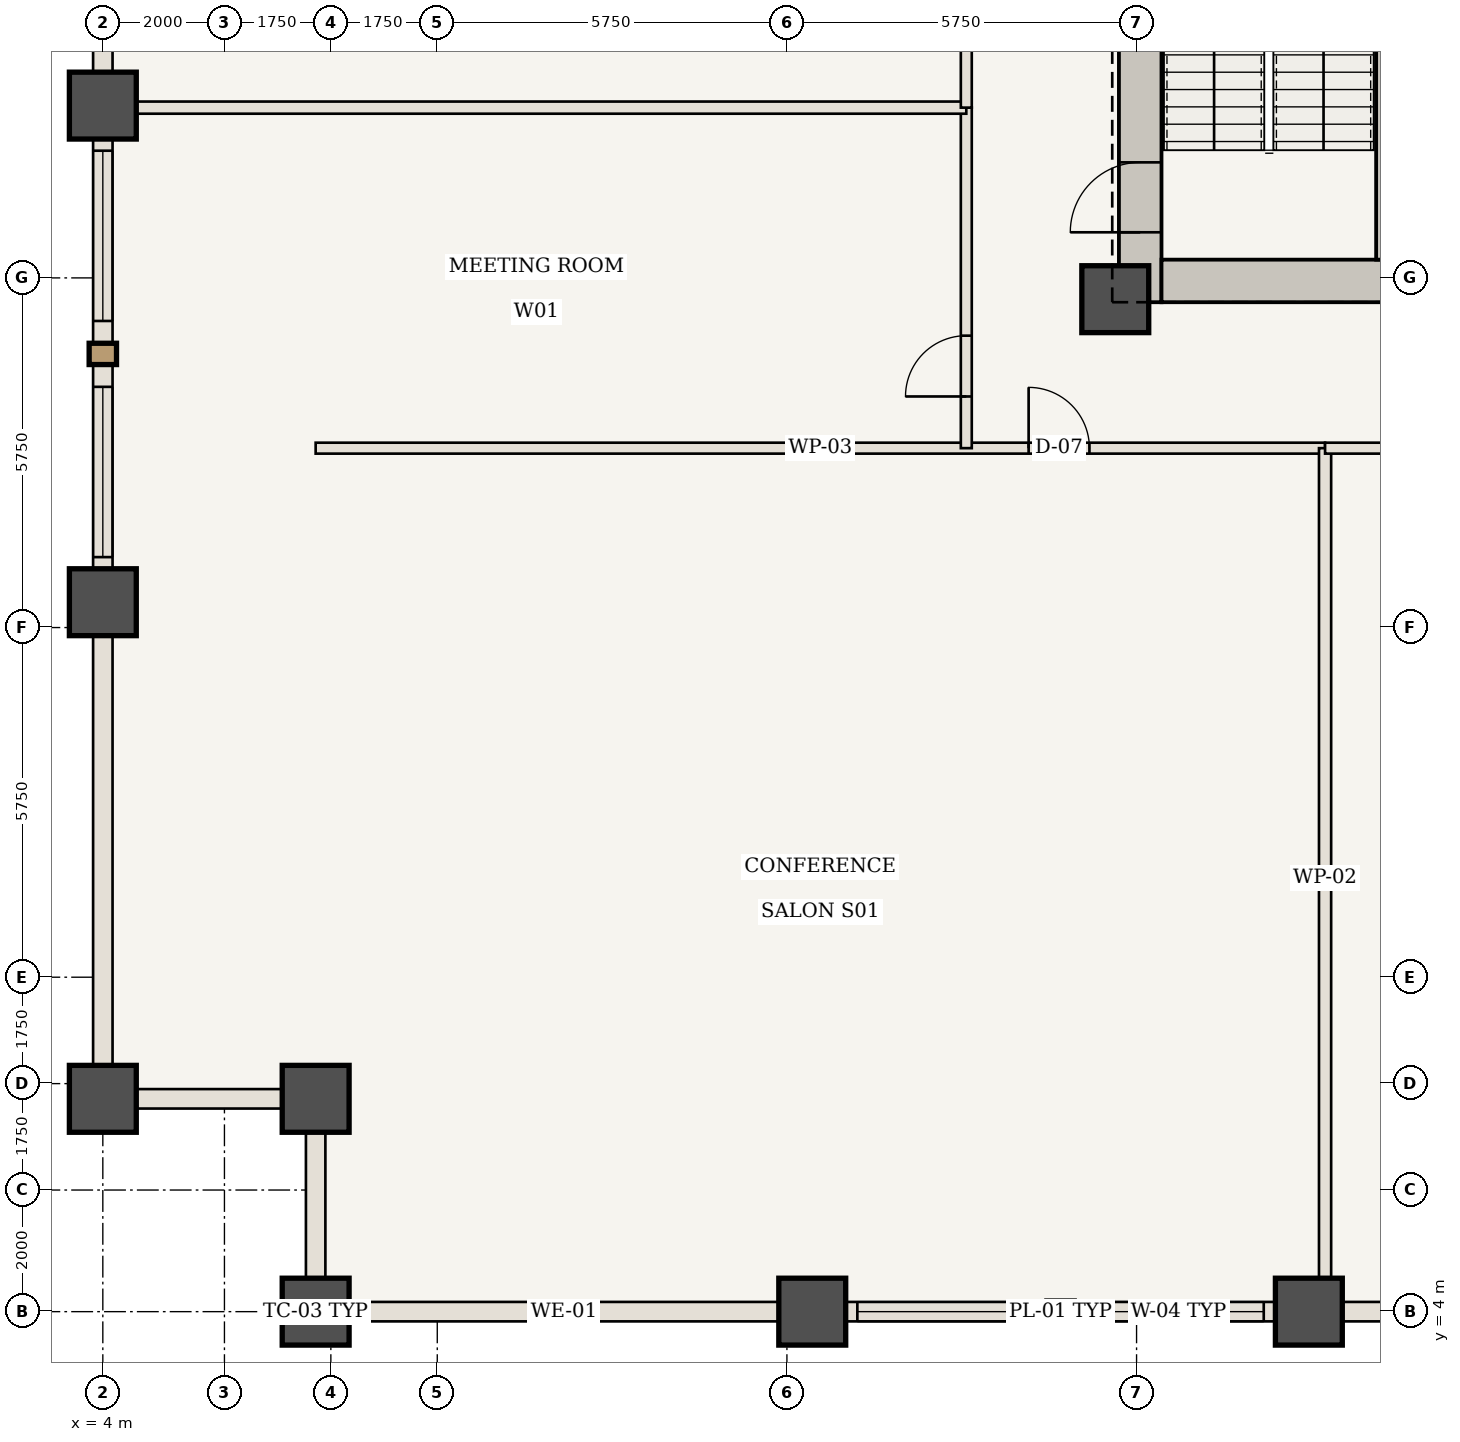
"""IFC4 building model, lengths in metres.
Left out: names, types, materials, properties, quantities, classifications, styles, units other than length and angle.
Written with IfcOpenShell. Run it as: python <this file> out.ifc"""

import sys

from ifc_helpers import new_model, si_unit, direction, frame, frame_2d, origin, origin_2d, place, context, subcontext, project, spatial, rectangle, extrude, element, fill, save


model = new_model("IFC4")
c1 = context("Model", 3, precision=1e-05, world=origin(), true_north=direction((0.0, 1.0)))
c2 = subcontext(c1, "Body", "Model", "MODEL_VIEW")
j1 = project(units=[si_unit("LENGTHUNIT", "METRE"), si_unit("PLANEANGLEUNIT", "RADIAN")], contexts=[c1])
p1 = place(None, origin())
s1 = spatial("IfcSite", under=j1, at=p1, CompositionType="ELEMENT")
p2 = place(p1, origin())
s2 = spatial("IfcBuilding", under=s1, at=p2, CompositionType="ELEMENT")
p3 = place(p2, frame((0.0, 0.0, 92.75)))
s3 = spatial("IfcBuildingStorey", under=s2, at=p3, CompositionType="ELEMENT", Elevation=92.75)
p4 = place(p3, frame((21.06, 20.6, 0.0), z_axis=(0.0, 0.0, 1.0), x_axis=(0.0, 1.0, 0.0)))
e1 = element("IfcWall", 1, at=p4, inside=s3, PredefinedType="SHEAR", context=c2, shape_type="SweptSolid", body=[
    extrude(rectangle(XDim=10.0, YDim=0.7, at=frame_2d((5.0, 0.0))), origin(), (0.0, 0.0, 1.0), 3.5),
])
p5 = place(p4, frame((1.15, 0.0, 0.0)))
e2 = element("IfcOpeningElement", 2, at=p5, cuts=e1, PredefinedType="OPENING", context=c2, shape_type="SweptSolid", body=[
    extrude(rectangle(XDim=1.15, YDim=2.15, at=frame_2d((0.575, 1.075))), frame((0.0, 0.36, 0.0), z_axis=(0.0, -1.0, 0.0), x_axis=(1.0, 0.0, 0.0)), (0.0, 0.0, 1.0), 0.72),
])
p6 = place(p3, frame((21.41, 20.95, 0.0), z_axis=(0.0, 0.0, 1.0), x_axis=(1.0, 0.0, 0.0)))
e3 = element("IfcWall", 3, at=p6, inside=s3, PredefinedType="SHEAR", context=c2, shape_type="SweptSolid", body=[
    extrude(rectangle(XDim=13.74, YDim=0.7, at=frame_2d((6.87, 0.0))), origin(), (0.0, 0.0, 1.0), 3.5),
])
p7 = place(p3, frame((25.29, 21.3, 0.0), z_axis=(0.0, 0.0, 1.0), x_axis=(0.0, 1.0, 0.0)))
e4 = element("IfcWall", 4, at=p7, inside=s3, PredefinedType="SHEAR", context=c2, shape_type="SweptSolid", body=[
    extrude(rectangle(XDim=9.3, YDim=0.7, at=frame_2d((4.65, 0.0))), origin(), (0.0, 0.0, 1.0), 3.5),
])
for number, where, z_axis, x_axis in (
    (5, (20.65, 20.65, 0.0), (0.0, 0.0, 1.0), (1.0, 0.0, 0.0)),
    (6, (7.5, 4.0, 0.0), (0.0, 0.0, 1.0), (1.0, 0.0, 0.0)),
    (7, (7.5, 7.5, 0.0), (0.0, 0.0, 1.0), (1.0, 0.0, 0.0)),
    (8, (4.0, 7.5, 0.0), (0.0, 0.0, 1.0), (1.0, 0.0, 0.0)),
    (9, (15.667, 4.0, 0.0), (0.0, 0.0, 1.0), (1.0, 0.0, 0.0)),
    (10, (4.0, 15.667, 0.0), (0.0, 0.0, 1.0), (1.0, 0.0, 0.0)),
    (11, (23.833, 4.0, 0.0), (0.0, 0.0, 1.0), (1.0, 0.0, 0.0)),
    (12, (4.0, 23.833, 0.0), (0.0, 0.0, 1.0), (1.0, 0.0, 0.0)),
):
    element("IfcColumn", number, at=place(p3, frame(where, z_axis=z_axis, x_axis=x_axis)), inside=s3, PredefinedType="COLUMN", context=c2, shape_type="SweptSolid", body=[
        extrude(rectangle(XDim=1.1, YDim=1.1, at=origin_2d()), origin(), (0.0, 0.0, 1.0), 3.5),
    ])
p8 = place(p3, frame((7.5, 18.2, 0.0), z_axis=(0.0, 0.0, 1.0), x_axis=(1.0, 0.0, 0.0)))
e13 = element("IfcWall", 13, at=p8, inside=s3, PredefinedType="STANDARD", context=c2, shape_type="SweptSolid", body=[
    extrude(rectangle(XDim=16.6, YDim=0.18, at=frame_2d((8.3, 0.0))), origin(), (0.0, 0.0, 1.0), 3.28),
])
p9 = place(p8, frame((11.725, 0.0, 0.0)))
e14 = element("IfcOpeningElement", 14, at=p9, cuts=e13, PredefinedType="OPENING", context=c2, shape_type="SweptSolid", body=[
    extrude(rectangle(XDim=1.0, YDim=2.15, at=frame_2d((0.5, 1.075))), frame((0.0, 0.1, 0.0), z_axis=(0.0, -1.0, 0.0), x_axis=(1.0, 0.0, 0.0)), (0.0, 0.0, 1.0), 0.2),
])
p10 = place(p3, frame((24.1, 4.06, 0.0), z_axis=(0.0, 0.0, 1.0), x_axis=(0.0, 1.0, 0.0)))
e15 = element("IfcWall", 15, at=p10, inside=s3, PredefinedType="STANDARD", context=c2, shape_type="SweptSolid", body=[
    extrude(rectangle(XDim=14.14, YDim=0.2, at=frame_2d((7.07, 0.0))), origin(), (0.0, 0.0, 1.0), 3.28),
])
p11 = place(p3, frame((24.1, 18.2, 0.0), z_axis=(0.0, 0.0, 1.0), x_axis=(1.0, 0.0, 0.0)))
e16 = element("IfcWall", 16, at=p11, inside=s3, PredefinedType="STANDARD", context=c2, shape_type="SweptSolid", body=[
    extrude(rectangle(XDim=9.7, YDim=0.18, at=frame_2d((4.85, 0.0))), origin(), (0.0, 0.0, 1.0), 3.28),
])
p12 = place(p11, frame((5.8, 0.0, 0.0)))
e17 = element("IfcOpeningElement", 17, at=p12, cuts=e16, PredefinedType="OPENING", context=c2, shape_type="SweptSolid", body=[
    extrude(rectangle(XDim=1.0, YDim=2.15, at=frame_2d((0.5, 1.075))), frame((0.0, 0.1, 0.0), z_axis=(0.0, -1.0, 0.0), x_axis=(1.0, 0.0, 0.0)), (0.0, 0.0, 1.0), 0.2),
])
p13 = place(p3, frame((18.2, 18.2, 0.0), z_axis=(0.0, 0.0, 1.0), x_axis=(0.0, 1.0, 0.0)))
e18 = element("IfcWall", 18, at=p13, inside=s3, PredefinedType="STANDARD", context=c2, shape_type="SweptSolid", body=[
    extrude(rectangle(XDim=5.6, YDim=0.18, at=frame_2d((2.8, 0.0))), origin(), (0.0, 0.0, 1.0), 3.28),
])
p14 = place(p13, frame((0.85, 0.0, 0.0)))
e19 = element("IfcOpeningElement", 19, at=p14, cuts=e18, PredefinedType="OPENING", context=c2, shape_type="SweptSolid", body=[
    extrude(rectangle(XDim=1.0, YDim=2.15, at=frame_2d((0.5, 1.075))), frame((0.0, 0.1, 0.0), z_axis=(0.0, -1.0, 0.0), x_axis=(1.0, 0.0, 0.0)), (0.0, 0.0, 1.0), 0.2),
])
p15 = place(p3, frame((4.06, 23.8, 0.0), z_axis=(0.0, 0.0, 1.0), x_axis=(1.0, 0.0, 0.0)))
e20 = element("IfcWall", 20, at=p15, inside=s3, PredefinedType="STANDARD", context=c2, shape_type="SweptSolid", body=[
    extrude(rectangle(XDim=14.14, YDim=0.2, at=frame_2d((7.07, 0.0))), origin(), (0.0, 0.0, 1.0), 3.28),
])
p16 = place(p3, frame((18.2, 23.8, 0.0), z_axis=(0.0, 0.0, 1.0), x_axis=(0.0, 1.0, 0.0)))
e21 = element("IfcWall", 21, at=p16, inside=s3, PredefinedType="STANDARD", context=c2, shape_type="SweptSolid", body=[
    extrude(rectangle(XDim=10.7, YDim=0.18, at=frame_2d((5.35, 0.0))), origin(), (0.0, 0.0, 1.0), 3.28),
])
p17 = place(p16, frame((4.85, 0.0, 0.0)))
e22 = element("IfcOpeningElement", 22, at=p17, cuts=e21, PredefinedType="OPENING", context=c2, shape_type="SweptSolid", body=[
    extrude(rectangle(XDim=1.0, YDim=2.15, at=frame_2d((0.5, 1.075))), frame((0.0, 0.1, 0.0), z_axis=(0.0, -1.0, 0.0), x_axis=(1.0, 0.0, 0.0)), (0.0, 0.0, 1.0), 0.2),
])
p18 = place(p3, frame((15.667, 4.0, 0.0), z_axis=(0.0, 0.0, 1.0), x_axis=(-1.0, 0.0, 0.0)))
e23 = element("IfcWall", 23, at=p18, inside=s3, PredefinedType="USERDEFINED", context=c2, shape_type="SweptSolid", body=[
    extrude(rectangle(XDim=8.167, YDim=0.32, at=frame_2d((4.083, 0.0))), origin(), (0.0, 0.0, 1.0), 2.48),
])
p19 = place(p3, frame((23.833, 4.0, 0.0), z_axis=(0.0, 0.0, 1.0), x_axis=(-1.0, 0.0, 0.0)))
e24 = element("IfcWall", 24, at=p19, inside=s3, PredefinedType="USERDEFINED", context=c2, shape_type="SweptSolid", body=[
    extrude(rectangle(XDim=8.167, YDim=0.32, at=frame_2d((4.083, 0.0))), origin(), (0.0, 0.0, 1.0), 2.48),
])
p20 = place(p19, frame((0.742, 0.0, 0.85)))
e25 = element("IfcOpeningElement", 25, at=p20, cuts=e24, PredefinedType="OPENING", context=c2, shape_type="SweptSolid", body=[
    extrude(rectangle(XDim=2.8, YDim=1.43, at=frame_2d((1.4, 0.715))), frame((0.0, 0.17, 0.0), z_axis=(0.0, -1.0, 0.0), x_axis=(1.0, 0.0, 0.0)), (0.0, 0.0, 1.0), 0.34),
])
p21 = place(p19, frame((4.625, 0.0, 0.85)))
e26 = element("IfcOpeningElement", 26, at=p21, cuts=e24, PredefinedType="OPENING", context=c2, shape_type="SweptSolid", body=[
    extrude(rectangle(XDim=2.8, YDim=1.43, at=frame_2d((1.4, 0.715))), frame((0.0, 0.17, 0.0), z_axis=(0.0, -1.0, 0.0), x_axis=(1.0, 0.0, 0.0)), (0.0, 0.0, 1.0), 0.34),
])
p22 = place(p3, frame((32.0, 4.0, 0.0), z_axis=(0.0, 0.0, 1.0), x_axis=(-1.0, 0.0, 0.0)))
e27 = element("IfcWall", 27, at=p22, inside=s3, PredefinedType="USERDEFINED", context=c2, shape_type="SweptSolid", body=[
    extrude(rectangle(XDim=8.167, YDim=0.32, at=frame_2d((4.083, 0.0))), origin(), (0.0, 0.0, 1.0), 2.48),
])
p23 = place(p22, frame((2.883, 0.0, 0.85)))
e28 = element("IfcOpeningElement", 28, at=p23, cuts=e27, PredefinedType="OPENING", context=c2, shape_type="SweptSolid", body=[
    extrude(rectangle(XDim=2.4, YDim=1.43, at=frame_2d((1.2, 0.715))), frame((0.0, 0.17, 0.0), z_axis=(0.0, -1.0, 0.0), x_axis=(1.0, 0.0, 0.0)), (0.0, 0.0, 1.0), 0.34),
])
p24 = place(p3, frame((4.0, 7.5, 0.0), z_axis=(0.0, 0.0, 1.0), x_axis=(0.0, 1.0, 0.0)))
e29 = element("IfcWall", 29, at=p24, inside=s3, PredefinedType="USERDEFINED", context=c2, shape_type="SweptSolid", body=[
    extrude(rectangle(XDim=8.167, YDim=0.32, at=frame_2d((4.083, 0.0))), origin(), (0.0, 0.0, 1.0), 2.48),
])
p25 = place(p3, frame((4.0, 15.667, 0.0), z_axis=(0.0, 0.0, 1.0), x_axis=(0.0, 1.0, 0.0)))
e30 = element("IfcWall", 30, at=p25, inside=s3, PredefinedType="USERDEFINED", context=c2, shape_type="SweptSolid", body=[
    extrude(rectangle(XDim=8.167, YDim=0.32, at=frame_2d((4.083, 0.0))), origin(), (0.0, 0.0, 1.0), 2.48),
])
p26 = place(p25, frame((0.742, 0.0, 0.85)))
e31 = element("IfcOpeningElement", 31, at=p26, cuts=e30, PredefinedType="OPENING", context=c2, shape_type="SweptSolid", body=[
    extrude(rectangle(XDim=2.8, YDim=1.43, at=frame_2d((1.4, 0.715))), frame((0.0, 0.17, 0.0), z_axis=(0.0, -1.0, 0.0), x_axis=(1.0, 0.0, 0.0)), (0.0, 0.0, 1.0), 0.34),
])
p27 = place(p25, frame((4.625, 0.0, 0.85)))
e32 = element("IfcOpeningElement", 32, at=p27, cuts=e30, PredefinedType="OPENING", context=c2, shape_type="SweptSolid", body=[
    extrude(rectangle(XDim=2.8, YDim=1.43, at=frame_2d((1.4, 0.715))), frame((0.0, 0.17, 0.0), z_axis=(0.0, -1.0, 0.0), x_axis=(1.0, 0.0, 0.0)), (0.0, 0.0, 1.0), 0.34),
])
p28 = place(p3, frame((4.0, 23.833, 0.0), z_axis=(0.0, 0.0, 1.0), x_axis=(0.0, 1.0, 0.0)))
e33 = element("IfcWall", 33, at=p28, inside=s3, PredefinedType="USERDEFINED", context=c2, shape_type="SweptSolid", body=[
    extrude(rectangle(XDim=8.167, YDim=0.32, at=frame_2d((4.083, 0.0))), origin(), (0.0, 0.0, 1.0), 2.48),
])
p29 = place(p28, frame((2.883, 0.0, 0.85)))
e34 = element("IfcOpeningElement", 34, at=p29, cuts=e33, PredefinedType="OPENING", context=c2, shape_type="SweptSolid", body=[
    extrude(rectangle(XDim=2.4, YDim=1.43, at=frame_2d((1.2, 0.715))), frame((0.0, 0.17, 0.0), z_axis=(0.0, -1.0, 0.0), x_axis=(1.0, 0.0, 0.0)), (0.0, 0.0, 1.0), 0.34),
])
for number, where, z_axis, x_axis in (
    (35, (7.5, 4.0, 0.0), (0.0, 0.0, 1.0), (0.0, 1.0, 0.0)),
    (36, (7.5, 7.5, 0.0), (0.0, 0.0, 1.0), (-1.0, 0.0, 0.0)),
):
    element("IfcWall", number, at=place(p3, frame(where, z_axis=z_axis, x_axis=x_axis)), inside=s3, PredefinedType="USERDEFINED", context=c2, shape_type="SweptSolid", body=[
        extrude(rectangle(XDim=3.5, YDim=0.32, at=frame_2d((1.75, 0.0))), origin(), (0.0, 0.0, 1.0), 2.48),
    ])
p30 = place(p5, origin())
e37 = element("IfcDoor", 37, at=p30, inside=s3, OperationType="SINGLE_SWING_LEFT", PredefinedType="DOOR", context=c2, shape_type="SweptSolid", body=[
    extrude(rectangle(XDim=1.15, YDim=2.15, at=frame_2d((0.575, 1.075))), frame((0.0, 0.025, 0.0), z_axis=(0.0, -1.0, 0.0), x_axis=(1.0, 0.0, 0.0)), (0.0, 0.0, 1.0), 0.05),
])
fill(e2, e37)
p31 = place(p9, origin())
e38 = element("IfcDoor", 38, at=p31, inside=s3, OperationType="SINGLE_SWING_LEFT", PredefinedType="DOOR", context=c2, shape_type="SweptSolid", body=[
    extrude(rectangle(XDim=1.0, YDim=2.15, at=frame_2d((0.5, 1.075))), frame((0.0, 0.025, 0.0), z_axis=(0.0, -1.0, 0.0), x_axis=(1.0, 0.0, 0.0)), (0.0, 0.0, 1.0), 0.05),
])
fill(e14, e38)
p32 = place(p14, origin())
e39 = element("IfcDoor", 39, at=p32, inside=s3, OperationType="SINGLE_SWING_LEFT", PredefinedType="DOOR", context=c2, shape_type="SweptSolid", body=[
    extrude(rectangle(XDim=1.0, YDim=2.15, at=frame_2d((0.5, 1.075))), frame((0.0, 0.025, 0.0), z_axis=(0.0, -1.0, 0.0), x_axis=(1.0, 0.0, 0.0)), (0.0, 0.0, 1.0), 0.05),
])
fill(e19, e39)
p33 = place(p20, origin())
e40 = element("IfcWindow", 40, at=p33, inside=s3, PartitioningType="SINGLE_PANEL", PredefinedType="WINDOW", context=c2, shape_type="SweptSolid", body=[
    extrude(rectangle(XDim=2.8, YDim=1.43, at=frame_2d((1.4, 0.715))), frame((0.0, 0.03, 0.0), z_axis=(0.0, -1.0, 0.0), x_axis=(1.0, 0.0, 0.0)), (0.0, 0.0, 1.0), 0.06),
])
fill(e25, e40)
p34 = place(p21, origin())
e41 = element("IfcWindow", 41, at=p34, inside=s3, PartitioningType="SINGLE_PANEL", PredefinedType="WINDOW", context=c2, shape_type="SweptSolid", body=[
    extrude(rectangle(XDim=2.8, YDim=1.43, at=frame_2d((1.4, 0.715))), frame((0.0, 0.03, 0.0), z_axis=(0.0, -1.0, 0.0), x_axis=(1.0, 0.0, 0.0)), (0.0, 0.0, 1.0), 0.06),
])
fill(e26, e41)
p35 = place(p26, origin())
e42 = element("IfcWindow", 42, at=p35, inside=s3, PartitioningType="SINGLE_PANEL", PredefinedType="WINDOW", context=c2, shape_type="SweptSolid", body=[
    extrude(rectangle(XDim=2.8, YDim=1.43, at=frame_2d((1.4, 0.715))), frame((0.0, 0.03, 0.0), z_axis=(0.0, -1.0, 0.0), x_axis=(1.0, 0.0, 0.0)), (0.0, 0.0, 1.0), 0.06),
])
fill(e31, e42)
p36 = place(p27, origin())
e43 = element("IfcWindow", 43, at=p36, inside=s3, PartitioningType="SINGLE_PANEL", PredefinedType="WINDOW", context=c2, shape_type="SweptSolid", body=[
    extrude(rectangle(XDim=2.8, YDim=1.43, at=frame_2d((1.4, 0.715))), frame((0.0, 0.03, 0.0), z_axis=(0.0, -1.0, 0.0), x_axis=(1.0, 0.0, 0.0)), (0.0, 0.0, 1.0), 0.06),
])
fill(e32, e43)
save(model, sys.argv[1])
